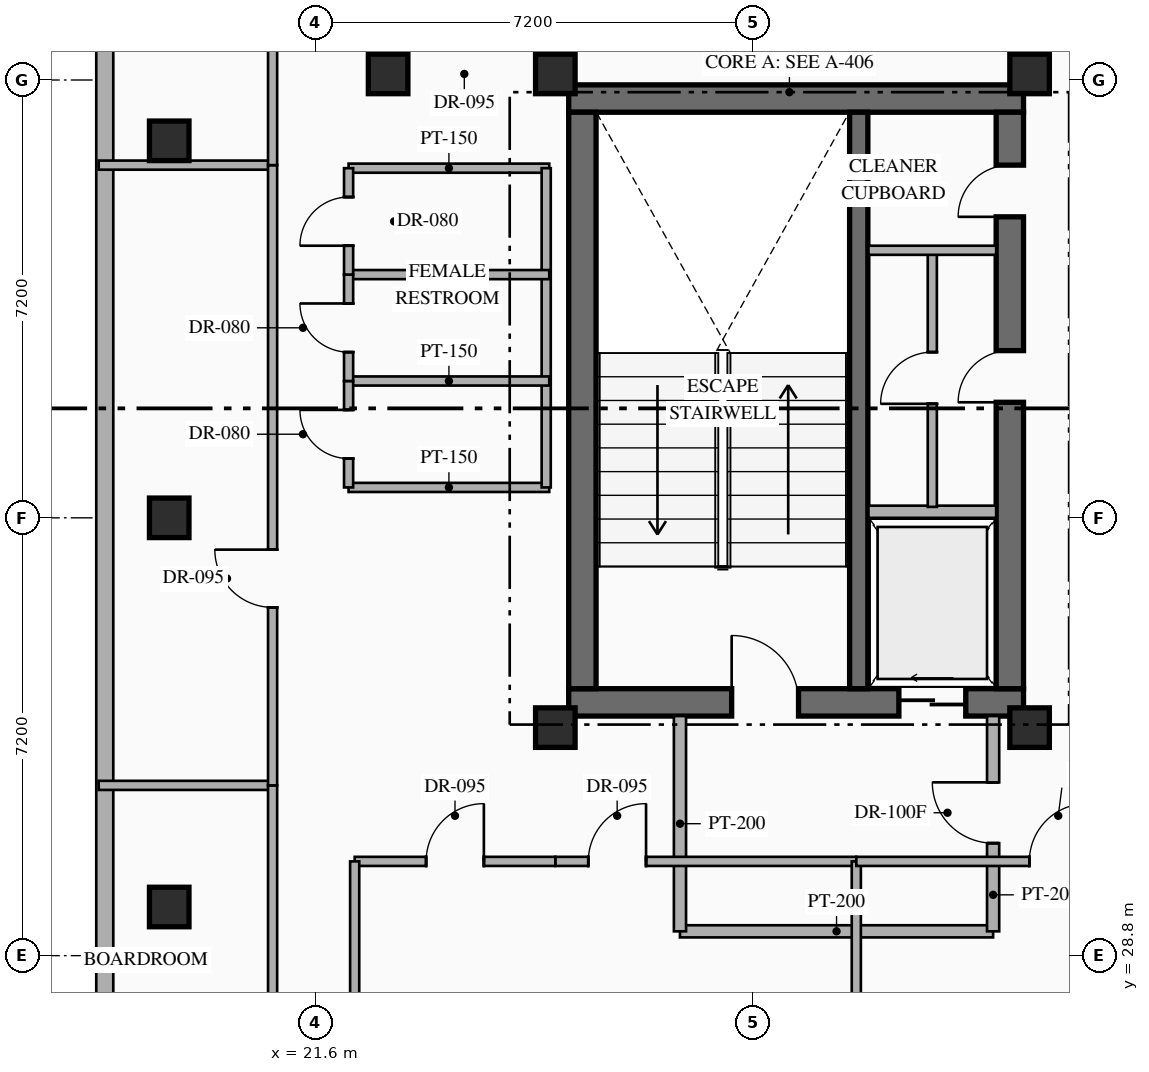
"""IFC4 building model, lengths in metres.
Left out: names, types, materials, properties, quantities, classifications, styles, units other than length and angle.
Written with IfcOpenShell. Run it as: python <this file> out.ifc"""

import sys

from ifc_helpers import new_model, si_unit, direction, frame, frame_2d, origin, origin_2d, place, context, subcontext, project, spatial, rectangle, hollow_rectangle, extrude, element, fill, save


model = new_model("IFC4")
c1 = context("Model", 3, precision=1e-05, world=origin(), true_north=direction((0.0, 1.0)))
c2 = subcontext(c1, "Body", "Model", "MODEL_VIEW")
j1 = project(units=[si_unit("LENGTHUNIT", "METRE"), si_unit("PLANEANGLEUNIT", "RADIAN")], contexts=[c1])
p1 = place(None, origin())
s1 = spatial("IfcSite", under=j1, at=p1, CompositionType="ELEMENT")
p2 = place(p1, origin())
s2 = spatial("IfcBuilding", under=s1, at=p2, CompositionType="ELEMENT")
p3 = place(p2, frame((0.0, 0.0, 253.95)))
s3 = spatial("IfcBuildingStorey", under=s2, at=p3, CompositionType="ELEMENT", Elevation=253.95)
p4 = place(p3, frame((25.77, 32.965, 0.0), z_axis=(0.0, 0.0, 1.0), x_axis=(1.0, 0.0, 0.0)))
e1 = element("IfcWall", 1, at=p4, inside=s3, PredefinedType="SHEAR", context=c2, shape_type="SweptSolid", body=[
    extrude(rectangle(XDim=7.48, YDim=0.45, at=frame_2d((3.74, 0.0))), origin(), (0.0, 0.0, 1.0), 3.6),
])
p5 = place(p4, frame((2.68, 0.0, 0.0)))
e2 = element("IfcOpeningElement", 2, at=p5, cuts=e1, PredefinedType="OPENING", context=c2, shape_type="SweptSolid", body=[
    extrude(rectangle(XDim=1.1, YDim=2.2, at=frame_2d((0.55, 1.1))), frame((0.0, 0.235, 0.0), z_axis=(0.0, -1.0, 0.0), x_axis=(1.0, 0.0, 0.0)), (0.0, 0.0, 1.0), 0.47),
])
p6 = place(p4, frame((5.43, 0.0, 0.0)))
e3 = element("IfcOpeningElement", 3, at=p6, cuts=e1, PredefinedType="OPENING", context=c2, shape_type="SweptSolid", body=[
    extrude(rectangle(XDim=1.1, YDim=2.15, at=frame_2d((0.55, 1.075))), frame((0.0, 0.235, 0.0), z_axis=(0.0, -1.0, 0.0), x_axis=(1.0, 0.0, 0.0)), (0.0, 0.0, 1.0), 0.47),
])
p7 = place(p3, frame((25.77, 42.895, 0.0), z_axis=(0.0, 0.0, 1.0), x_axis=(1.0, 0.0, 0.0)))
e4 = element("IfcWall", 4, at=p7, inside=s3, PredefinedType="SHEAR", context=c2, shape_type="SweptSolid", body=[
    extrude(rectangle(XDim=7.48, YDim=0.45, at=frame_2d((3.74, 0.0))), origin(), (0.0, 0.0, 1.0), 3.6),
])
p8 = place(p3, frame((25.995, 33.19, 0.0), z_axis=(0.0, 0.0, 1.0), x_axis=(0.0, 1.0, 0.0)))
e5 = element("IfcWall", 5, at=p8, inside=s3, PredefinedType="SHEAR", context=c2, shape_type="SweptSolid", body=[
    extrude(rectangle(XDim=9.48, YDim=0.45, at=frame_2d((4.74, 0.0))), origin(), (0.0, 0.0, 1.0), 3.6),
])
p9 = place(p3, frame((33.025, 33.19, 0.0), z_axis=(0.0, 0.0, 1.0), x_axis=(0.0, 1.0, 0.0)))
e6 = element("IfcWall", 6, at=p9, inside=s3, PredefinedType="SHEAR", context=c2, shape_type="SweptSolid", body=[
    extrude(rectangle(XDim=9.48, YDim=0.45, at=frame_2d((4.74, 0.0))), origin(), (0.0, 0.0, 1.0), 3.6),
])
p10 = place(p9, frame((4.71, 0.0, 0.0)))
e7 = element("IfcOpeningElement", 7, at=p10, cuts=e6, PredefinedType="OPENING", context=c2, shape_type="SweptSolid", body=[
    extrude(rectangle(XDim=0.85, YDim=2.08, at=frame_2d((0.425, 1.04))), frame((0.0, 0.235, 0.0), z_axis=(0.0, -1.0, 0.0), x_axis=(1.0, 0.0, 0.0)), (0.0, 0.0, 1.0), 0.47),
])
p11 = place(p9, frame((7.76, 0.0, 0.0)))
e8 = element("IfcOpeningElement", 8, at=p11, cuts=e6, PredefinedType="OPENING", context=c2, shape_type="SweptSolid", body=[
    extrude(rectangle(XDim=0.85, YDim=2.08, at=frame_2d((0.425, 1.04))), frame((0.0, 0.235, 0.0), z_axis=(0.0, -1.0, 0.0), x_axis=(1.0, 0.0, 0.0)), (0.0, 0.0, 1.0), 0.47),
])
p12 = place(p3, frame((30.54, 33.19, 0.0), z_axis=(0.0, 0.0, 1.0), x_axis=(0.0, 1.0, 0.0)))
e9 = element("IfcWall", 9, at=p12, inside=s3, PredefinedType="SHEAR", context=c2, shape_type="SweptSolid", body=[
    extrude(rectangle(XDim=9.48, YDim=0.3, at=frame_2d((4.74, 0.0))), origin(), (0.0, 0.0, 1.0), 3.6),
])
for number, where, z_axis, x_axis in (
    (10, (25.55, 32.55, 0.0), (0.0, 0.0, 1.0), (1.0, 0.0, 0.0)),
    (11, (33.35, 32.55, 0.0), (0.0, 0.0, 1.0), (1.0, 0.0, 0.0)),
    (12, (25.55, 43.3, 0.0), (0.0, 0.0, 1.0), (1.0, 0.0, 0.0)),
    (13, (33.35, 43.3, 0.0), (0.0, 0.0, 1.0), (1.0, 0.0, 0.0)),
    (14, (19.2, 29.6, 0.0), (0.0, 0.0, 1.0), (1.0, 0.0, 0.0)),
    (15, (19.2, 42.2, 0.0), (0.0, 0.0, 1.0), (1.0, 0.0, 0.0)),
    (16, (22.8, 43.3, 0.0), (0.0, 0.0, 1.0), (1.0, 0.0, 0.0)),
    (17, (19.2, 36.0, 0.0), (0.0, 0.0, 1.0), (1.0, 0.0, 0.0)),
):
    element("IfcColumn", number, at=place(p3, frame(where, z_axis=z_axis, x_axis=x_axis)), inside=s3, PredefinedType="COLUMN", context=c2, shape_type="SweptSolid", body=[
        extrude(hollow_rectangle(XDim=0.65, YDim=0.65, WallThickness=0.025, at=origin_2d()), origin(), (0.0, 0.0, 1.0), 3.6),
    ])
p13 = place(p3, frame((18.14, 25.858, 0.0), z_axis=(0.0, 0.0, 1.0), x_axis=(0.0, 1.0, 0.0)))
e18 = element("IfcWall", 18, at=p13, inside=s3, PredefinedType="STANDARD", context=c2, shape_type="SweptSolid", body=[
    extrude(rectangle(XDim=22.084, YDim=0.28, at=frame_2d((11.042, 0.0))), origin(), (0.0, 0.0, 1.0), 3.35),
])
p14 = place(p3, frame((30.7, 36.1, 0.0), z_axis=(0.0, 0.0, 1.0), x_axis=(1.0, 0.0, 0.0)))
e19 = element("IfcWall", 19, at=p14, inside=s3, PredefinedType="STANDARD", context=c2, shape_type="SweptSolid", body=[
    extrude(rectangle(XDim=2.1, YDim=0.2, at=frame_2d((1.05, 0.0))), origin(), (0.0, 0.0, 1.0), 3.35),
])
p15 = place(p3, frame((31.75, 36.18, 0.0), z_axis=(0.0, 0.0, 1.0), x_axis=(0.0, 1.0, 0.0)))
e20 = element("IfcWall", 20, at=p15, inside=s3, PredefinedType="PARTITIONING", context=c2, shape_type="SweptSolid", body=[
    extrude(rectangle(XDim=4.24, YDim=0.15, at=frame_2d((2.12, 0.0))), origin(), (0.0, 0.0, 1.0), 3.35),
])
p16 = place(p15, frame((1.695, 0.0, 0.0)))
e21 = element("IfcOpeningElement", 21, at=p16, cuts=e20, PredefinedType="OPENING", context=c2, shape_type="SweptSolid", body=[
    extrude(rectangle(XDim=0.85, YDim=2.08, at=frame_2d((0.425, 1.04))), frame((0.0, 0.085, 0.0), z_axis=(0.0, -1.0, 0.0), x_axis=(1.0, 0.0, 0.0)), (0.0, 0.0, 1.0), 0.17),
])
p17 = place(p3, frame((30.7, 40.4, 0.0), z_axis=(0.0, 0.0, 1.0), x_axis=(1.0, 0.0, 0.0)))
e22 = element("IfcWall", 22, at=p17, inside=s3, PredefinedType="PARTITIONING", context=c2, shape_type="SweptSolid", body=[
    extrude(rectangle(XDim=2.1, YDim=0.15, at=frame_2d((1.05, 0.0))), origin(), (0.0, 0.0, 1.0), 3.35),
])
p18 = place(p3, frame((27.6, 29.2, 0.0), z_axis=(0.0, 0.0, 1.0), x_axis=(1.0, 0.0, 0.0)))
e23 = element("IfcWall", 23, at=p18, inside=s3, PredefinedType="STANDARD", context=c2, shape_type="SweptSolid", body=[
    extrude(rectangle(XDim=5.15, YDim=0.2, at=frame_2d((2.575, 0.0))), origin(), (0.0, 0.0, 1.0), 3.35),
])
p19 = place(p3, frame((27.6, 29.2, 0.0), z_axis=(0.0, 0.0, 1.0), x_axis=(0.0, 1.0, 0.0)))
e24 = element("IfcWall", 24, at=p19, inside=s3, PredefinedType="STANDARD", context=c2, shape_type="SweptSolid", body=[
    extrude(rectangle(XDim=3.54, YDim=0.2, at=frame_2d((1.77, 0.0))), origin(), (0.0, 0.0, 1.0), 3.35),
])
p20 = place(p3, frame((32.75, 29.2, 0.0), z_axis=(0.0, 0.0, 1.0), x_axis=(0.0, 1.0, 0.0)))
e25 = element("IfcWall", 25, at=p20, inside=s3, PredefinedType="STANDARD", context=c2, shape_type="SweptSolid", body=[
    extrude(rectangle(XDim=3.54, YDim=0.2, at=frame_2d((1.77, 0.0))), origin(), (0.0, 0.0, 1.0), 3.35),
])
p21 = place(p20, frame((1.45, 0.0, 0.0)))
e26 = element("IfcOpeningElement", 26, at=p21, cuts=e25, PredefinedType="OPENING", context=c2, shape_type="SweptSolid", body=[
    extrude(rectangle(XDim=1.0, YDim=2.2, at=frame_2d((0.5, 1.1))), frame((0.0, 0.11, 0.0), z_axis=(0.0, -1.0, 0.0), x_axis=(1.0, 0.0, 0.0)), (0.0, 0.0, 1.0), 0.22),
])
for number, where, z_axis, x_axis in (
    (27, (22.15, 36.5, 0.0), (0.0, 0.0, 1.0), (1.0, 0.0, 0.0)),
    (28, (22.15, 41.75, 0.0), (0.0, 0.0, 1.0), (1.0, 0.0, 0.0)),
):
    element("IfcWall", number, at=place(p3, frame(where, z_axis=z_axis, x_axis=x_axis)), inside=s3, PredefinedType="PARTITIONING", context=c2, shape_type="SweptSolid", body=[
        extrude(rectangle(XDim=3.3, YDim=0.15, at=frame_2d((1.65, 0.0))), origin(), (0.0, 0.0, 1.0), 3.35),
    ])
p22 = place(p3, frame((25.4, 36.5, 0.0), z_axis=(0.0, 0.0, 1.0), x_axis=(0.0, 1.0, 0.0)))
e29 = element("IfcWall", 29, at=p22, inside=s3, PredefinedType="PARTITIONING", context=c2, shape_type="SweptSolid", body=[
    extrude(rectangle(XDim=5.25, YDim=0.15, at=frame_2d((2.625, 0.0))), origin(), (0.0, 0.0, 1.0), 3.35),
])
for number, where, z_axis, x_axis in (
    (30, (22.15, 38.25, 0.0), (0.0, 0.0, 1.0), (1.0, 0.0, 0.0)),
    (31, (22.15, 40.0, 0.0), (0.0, 0.0, 1.0), (1.0, 0.0, 0.0)),
):
    element("IfcWall", number, at=place(p3, frame(where, z_axis=z_axis, x_axis=x_axis)), inside=s3, PredefinedType="PARTITIONING", context=c2, shape_type="SweptSolid", body=[
        extrude(rectangle(XDim=3.3, YDim=0.15, at=frame_2d((1.65, 0.0))), origin(), (0.0, 0.0, 1.0), 3.35),
    ])
p23 = place(p3, frame((22.15, 36.5, 0.0), z_axis=(0.0, 0.0, 1.0), x_axis=(0.0, 1.0, 0.0)))
e32 = element("IfcWall", 32, at=p23, inside=s3, PredefinedType="PARTITIONING", context=c2, shape_type="SweptSolid", body=[
    extrude(rectangle(XDim=1.75, YDim=0.15, at=frame_2d((0.875, 0.0))), origin(), (0.0, 0.0, 1.0), 3.35),
])
p24 = place(p23, frame((0.475, 0.0, 0.0)))
e33 = element("IfcOpeningElement", 33, at=p24, cuts=e32, PredefinedType="OPENING", context=c2, shape_type="SweptSolid", body=[
    extrude(rectangle(XDim=0.8, YDim=2.06, at=frame_2d((0.4, 1.03))), frame((0.0, 0.085, 0.0), z_axis=(0.0, -1.0, 0.0), x_axis=(1.0, 0.0, 0.0)), (0.0, 0.0, 1.0), 0.17),
])
p25 = place(p3, frame((22.15, 38.25, 0.0), z_axis=(0.0, 0.0, 1.0), x_axis=(0.0, 1.0, 0.0)))
e34 = element("IfcWall", 34, at=p25, inside=s3, PredefinedType="PARTITIONING", context=c2, shape_type="SweptSolid", body=[
    extrude(rectangle(XDim=1.75, YDim=0.15, at=frame_2d((0.875, 0.0))), origin(), (0.0, 0.0, 1.0), 3.35),
])
p26 = place(p25, frame((0.475, 0.0, 0.0)))
e35 = element("IfcOpeningElement", 35, at=p26, cuts=e34, PredefinedType="OPENING", context=c2, shape_type="SweptSolid", body=[
    extrude(rectangle(XDim=0.8, YDim=2.06, at=frame_2d((0.4, 1.03))), frame((0.0, 0.085, 0.0), z_axis=(0.0, -1.0, 0.0), x_axis=(1.0, 0.0, 0.0)), (0.0, 0.0, 1.0), 0.17),
])
p27 = place(p3, frame((22.15, 40.0, 0.0), z_axis=(0.0, 0.0, 1.0), x_axis=(0.0, 1.0, 0.0)))
e36 = element("IfcWall", 36, at=p27, inside=s3, PredefinedType="PARTITIONING", context=c2, shape_type="SweptSolid", body=[
    extrude(rectangle(XDim=1.75, YDim=0.15, at=frame_2d((0.875, 0.0))), origin(), (0.0, 0.0, 1.0), 3.35),
])
p28 = place(p27, frame((0.475, 0.0, 0.0)))
e37 = element("IfcOpeningElement", 37, at=p28, cuts=e36, PredefinedType="OPENING", context=c2, shape_type="SweptSolid", body=[
    extrude(rectangle(XDim=0.8, YDim=2.06, at=frame_2d((0.4, 1.03))), frame((0.0, 0.085, 0.0), z_axis=(0.0, -1.0, 0.0), x_axis=(1.0, 0.0, 0.0)), (0.0, 0.0, 1.0), 0.17),
])
p29 = place(p3, frame((25.55, 30.35, 0.0), z_axis=(0.0, 0.0, 1.0), x_axis=(1.0, 0.0, 0.0)))
e38 = element("IfcWall", 38, at=p29, inside=s3, PredefinedType="PARTITIONING", context=c2, shape_type="SweptSolid", body=[
    extrude(rectangle(XDim=4.95, YDim=0.15, at=frame_2d((2.475, 0.0))), origin(), (0.0, 0.0, 1.0), 3.35),
])
p30 = place(p29, frame((0.542, 0.0, 0.0)))
e39 = element("IfcOpeningElement", 39, at=p30, cuts=e38, PredefinedType="OPENING", context=c2, shape_type="SweptSolid", body=[
    extrude(rectangle(XDim=0.95, YDim=2.15, at=frame_2d((0.475, 1.075))), frame((0.0, 0.085, 0.0), z_axis=(0.0, -1.0, 0.0), x_axis=(1.0, 0.0, 0.0)), (0.0, 0.0, 1.0), 0.17),
])
p31 = place(p3, frame((30.5, 23.2, 0.0), z_axis=(0.0, 0.0, 1.0), x_axis=(0.0, 1.0, 0.0)))
e40 = element("IfcWall", 40, at=p31, inside=s3, PredefinedType="PARTITIONING", context=c2, shape_type="SweptSolid", body=[
    extrude(rectangle(XDim=7.15, YDim=0.15, at=frame_2d((3.575, 0.0))), origin(), (0.0, 0.0, 1.0), 3.35),
])
p32 = place(p3, frame((30.5, 30.35, 0.0), z_axis=(0.0, 0.0, 1.0), x_axis=(1.0, 0.0, 0.0)))
e41 = element("IfcWall", 41, at=p32, inside=s3, PredefinedType="PARTITIONING", context=c2, shape_type="SweptSolid", body=[
    extrude(rectangle(XDim=4.45, YDim=0.15, at=frame_2d((2.225, 0.0))), origin(), (0.0, 0.0, 1.0), 3.35),
])
p33 = place(p32, frame((2.846, 0.0, 0.0)))
e42 = element("IfcOpeningElement", 42, at=p33, cuts=e41, PredefinedType="OPENING", context=c2, shape_type="SweptSolid", body=[
    extrude(rectangle(XDim=0.95, YDim=2.15, at=frame_2d((0.475, 1.075))), frame((0.0, 0.085, 0.0), z_axis=(0.0, -1.0, 0.0), x_axis=(1.0, 0.0, 0.0)), (0.0, 0.0, 1.0), 0.17),
])
p34 = place(p3, frame((18.04, 31.6, 0.0), z_axis=(0.0, 0.0, 1.0), x_axis=(1.0, 0.0, 0.0)))
e43 = element("IfcWall", 43, at=p34, inside=s3, PredefinedType="PARTITIONING", context=c2, shape_type="SweptSolid", body=[
    extrude(rectangle(XDim=2.86, YDim=0.15, at=frame_2d((1.43, 0.0))), origin(), (0.0, 0.0, 1.0), 3.35),
])
p35 = place(p3, frame((20.9, 23.44, 0.0), z_axis=(0.0, 0.0, 1.0), x_axis=(0.0, 1.0, 0.0)))
e44 = element("IfcWall", 44, at=p35, inside=s3, PredefinedType="PARTITIONING", context=c2, shape_type="SweptSolid", body=[
    extrude(rectangle(XDim=8.16, YDim=0.15, at=frame_2d((4.08, 0.0))), origin(), (0.0, 0.0, 1.0), 3.35),
])
p36 = place(p35, frame((3.605, 0.0, 0.0)))
e45 = element("IfcOpeningElement", 45, at=p36, cuts=e44, PredefinedType="OPENING", context=c2, shape_type="SweptSolid", body=[
    extrude(rectangle(XDim=0.95, YDim=2.15, at=frame_2d((0.475, 1.075))), frame((0.0, 0.085, 0.0), z_axis=(0.0, -1.0, 0.0), x_axis=(1.0, 0.0, 0.0)), (0.0, 0.0, 1.0), 0.17),
])
p37 = place(p3, frame((18.04, 41.8, 0.0), z_axis=(0.0, 0.0, 1.0), x_axis=(1.0, 0.0, 0.0)))
e46 = element("IfcWall", 46, at=p37, inside=s3, PredefinedType="PARTITIONING", context=c2, shape_type="SweptSolid", body=[
    extrude(rectangle(XDim=2.86, YDim=0.15, at=frame_2d((1.43, 0.0))), origin(), (0.0, 0.0, 1.0), 3.35),
])
p38 = place(p3, frame((20.9, 31.6, 0.0), z_axis=(0.0, 0.0, 1.0), x_axis=(0.0, 1.0, 0.0)))
e47 = element("IfcWall", 47, at=p38, inside=s3, PredefinedType="PARTITIONING", context=c2, shape_type="SweptSolid", body=[
    extrude(rectangle(XDim=10.2, YDim=0.15, at=frame_2d((5.1, 0.0))), origin(), (0.0, 0.0, 1.0), 3.35),
])
p39 = place(p38, frame((2.927, 0.0, 0.0)))
e48 = element("IfcOpeningElement", 48, at=p39, cuts=e47, PredefinedType="OPENING", context=c2, shape_type="SweptSolid", body=[
    extrude(rectangle(XDim=0.95, YDim=2.15, at=frame_2d((0.475, 1.075))), frame((0.0, 0.085, 0.0), z_axis=(0.0, -1.0, 0.0), x_axis=(1.0, 0.0, 0.0)), (0.0, 0.0, 1.0), 0.17),
])
p40 = place(p3, frame((20.9, 41.8, 0.0), z_axis=(0.0, 0.0, 1.0), x_axis=(0.0, 1.0, 0.0)))
e49 = element("IfcWall", 49, at=p40, inside=s3, PredefinedType="PARTITIONING", context=c2, shape_type="SweptSolid", body=[
    extrude(rectangle(XDim=8.56, YDim=0.15, at=frame_2d((4.28, 0.0))), origin(), (0.0, 0.0, 1.0), 3.35),
])
p41 = place(p40, frame((3.805, 0.0, 0.0)))
e50 = element("IfcOpeningElement", 50, at=p41, cuts=e49, PredefinedType="OPENING", context=c2, shape_type="SweptSolid", body=[
    extrude(rectangle(XDim=0.95, YDim=2.15, at=frame_2d((0.475, 1.075))), frame((0.0, 0.085, 0.0), z_axis=(0.0, -1.0, 0.0), x_axis=(1.0, 0.0, 0.0)), (0.0, 0.0, 1.0), 0.17),
])
p42 = place(p3, frame((22.25, 30.35, 0.0), z_axis=(0.0, 0.0, 1.0), x_axis=(1.0, 0.0, 0.0)))
e51 = element("IfcWall", 51, at=p42, inside=s3, PredefinedType="PARTITIONING", context=c2, shape_type="SweptSolid", body=[
    extrude(rectangle(XDim=3.3, YDim=0.15, at=frame_2d((1.65, 0.0))), origin(), (0.0, 0.0, 1.0), 3.35),
])
p43 = place(p42, frame((1.175, 0.0, 0.0)))
e52 = element("IfcOpeningElement", 52, at=p43, cuts=e51, PredefinedType="OPENING", context=c2, shape_type="SweptSolid", body=[
    extrude(rectangle(XDim=0.95, YDim=2.15, at=frame_2d((0.475, 1.075))), frame((0.0, 0.085, 0.0), z_axis=(0.0, -1.0, 0.0), x_axis=(1.0, 0.0, 0.0)), (0.0, 0.0, 1.0), 0.17),
])
p44 = place(p3, frame((22.25, 23.44, 0.0), z_axis=(0.0, 0.0, 1.0), x_axis=(0.0, 1.0, 0.0)))
e53 = element("IfcWall", 53, at=p44, inside=s3, PredefinedType="PARTITIONING", context=c2, shape_type="SweptSolid", body=[
    extrude(rectangle(XDim=6.91, YDim=0.15, at=frame_2d((3.455, 0.0))), origin(), (0.0, 0.0, 1.0), 3.35),
])
p45 = place(p5, origin())
e54 = element("IfcDoor", 54, at=p45, inside=s3, OperationType="SINGLE_SWING_LEFT", PredefinedType="DOOR", context=c2, shape_type="SweptSolid", body=[
    extrude(rectangle(XDim=1.1, YDim=2.2, at=frame_2d((0.55, 1.1))), frame((0.0, 0.025, 0.0), z_axis=(0.0, -1.0, 0.0), x_axis=(1.0, 0.0, 0.0)), (0.0, 0.0, 1.0), 0.05),
])
fill(e2, e54)
p46 = place(p6, origin())
e55 = element("IfcDoor", 55, at=p46, inside=s3, OperationType="SLIDING_TO_LEFT", PredefinedType="USERDEFINED", context=c2, shape_type="SweptSolid", body=[
    extrude(rectangle(XDim=1.1, YDim=2.15, at=frame_2d((0.55, 1.075))), frame((0.0, 0.025, 0.0), z_axis=(0.0, -1.0, 0.0), x_axis=(1.0, 0.0, 0.0)), (0.0, 0.0, 1.0), 0.05),
])
fill(e3, e55)
p47 = place(p10, origin())
e56 = element("IfcDoor", 56, at=p47, inside=s3, OperationType="SINGLE_SWING_LEFT", PredefinedType="DOOR", context=c2, shape_type="SweptSolid", body=[
    extrude(rectangle(XDim=0.85, YDim=2.08, at=frame_2d((0.425, 1.04))), frame((0.0, 0.025, 0.0), z_axis=(0.0, -1.0, 0.0), x_axis=(1.0, 0.0, 0.0)), (0.0, 0.0, 1.0), 0.05),
])
fill(e7, e56)
p48 = place(p11, origin())
e57 = element("IfcDoor", 57, at=p48, inside=s3, OperationType="SINGLE_SWING_LEFT", PredefinedType="DOOR", context=c2, shape_type="SweptSolid", body=[
    extrude(rectangle(XDim=0.85, YDim=2.08, at=frame_2d((0.425, 1.04))), frame((0.0, 0.025, 0.0), z_axis=(0.0, -1.0, 0.0), x_axis=(1.0, 0.0, 0.0)), (0.0, 0.0, 1.0), 0.05),
])
fill(e8, e57)
p49 = place(p16, origin())
e58 = element("IfcDoor", 58, at=p49, inside=s3, OperationType="SINGLE_SWING_LEFT", PredefinedType="DOOR", context=c2, shape_type="SweptSolid", body=[
    extrude(rectangle(XDim=0.85, YDim=2.08, at=frame_2d((0.425, 1.04))), frame((0.0, 0.025, 0.0), z_axis=(0.0, -1.0, 0.0), x_axis=(1.0, 0.0, 0.0)), (0.0, 0.0, 1.0), 0.05),
])
fill(e21, e58)
p50 = place(p21, origin())
e59 = element("IfcDoor", 59, at=p50, inside=s3, OperationType="SINGLE_SWING_RIGHT", PredefinedType="DOOR", context=c2, shape_type="SweptSolid", body=[
    extrude(rectangle(XDim=1.0, YDim=2.2, at=frame_2d((0.5, 1.1))), frame((0.0, 0.025, 0.0), z_axis=(0.0, -1.0, 0.0), x_axis=(1.0, 0.0, 0.0)), (0.0, 0.0, 1.0), 0.05),
])
fill(e26, e59)
p51 = place(p24, origin())
e60 = element("IfcDoor", 60, at=p51, inside=s3, OperationType="SINGLE_SWING_RIGHT", PredefinedType="DOOR", context=c2, shape_type="SweptSolid", body=[
    extrude(rectangle(XDim=0.8, YDim=2.06, at=frame_2d((0.4, 1.03))), frame((0.0, 0.025, 0.0), z_axis=(0.0, -1.0, 0.0), x_axis=(1.0, 0.0, 0.0)), (0.0, 0.0, 1.0), 0.05),
])
fill(e33, e60)
p52 = place(p26, origin())
e61 = element("IfcDoor", 61, at=p52, inside=s3, OperationType="SINGLE_SWING_RIGHT", PredefinedType="DOOR", context=c2, shape_type="SweptSolid", body=[
    extrude(rectangle(XDim=0.8, YDim=2.06, at=frame_2d((0.4, 1.03))), frame((0.0, 0.025, 0.0), z_axis=(0.0, -1.0, 0.0), x_axis=(1.0, 0.0, 0.0)), (0.0, 0.0, 1.0), 0.05),
])
fill(e35, e61)
p53 = place(p28, origin())
e62 = element("IfcDoor", 62, at=p53, inside=s3, OperationType="SINGLE_SWING_LEFT", PredefinedType="DOOR", context=c2, shape_type="SweptSolid", body=[
    extrude(rectangle(XDim=0.8, YDim=2.06, at=frame_2d((0.4, 1.03))), frame((0.0, 0.025, 0.0), z_axis=(0.0, -1.0, 0.0), x_axis=(1.0, 0.0, 0.0)), (0.0, 0.0, 1.0), 0.05),
])
fill(e37, e62)
p54 = place(p30, origin())
e63 = element("IfcDoor", 63, at=p54, inside=s3, OperationType="SINGLE_SWING_RIGHT", PredefinedType="DOOR", context=c2, shape_type="SweptSolid", body=[
    extrude(rectangle(XDim=0.95, YDim=2.15, at=frame_2d((0.475, 1.075))), frame((0.0, 0.025, 0.0), z_axis=(0.0, -1.0, 0.0), x_axis=(1.0, 0.0, 0.0)), (0.0, 0.0, 1.0), 0.05),
])
fill(e39, e63)
p55 = place(p33, origin())
e64 = element("IfcDoor", 64, at=p55, inside=s3, OperationType="SINGLE_SWING_RIGHT", PredefinedType="DOOR", context=c2, shape_type="SweptSolid", body=[
    extrude(rectangle(XDim=0.95, YDim=2.15, at=frame_2d((0.475, 1.075))), frame((0.0, 0.025, 0.0), z_axis=(0.0, -1.0, 0.0), x_axis=(1.0, 0.0, 0.0)), (0.0, 0.0, 1.0), 0.05),
])
fill(e42, e64)
p56 = place(p39, origin())
e65 = element("IfcDoor", 65, at=p56, inside=s3, OperationType="SINGLE_SWING_RIGHT", PredefinedType="DOOR", context=c2, shape_type="SweptSolid", body=[
    extrude(rectangle(XDim=0.95, YDim=2.15, at=frame_2d((0.475, 1.075))), frame((0.0, 0.025, 0.0), z_axis=(0.0, -1.0, 0.0), x_axis=(1.0, 0.0, 0.0)), (0.0, 0.0, 1.0), 0.05),
])
fill(e48, e65)
p57 = place(p43, origin())
e66 = element("IfcDoor", 66, at=p57, inside=s3, OperationType="SINGLE_SWING_RIGHT", PredefinedType="DOOR", context=c2, shape_type="SweptSolid", body=[
    extrude(rectangle(XDim=0.95, YDim=2.15, at=frame_2d((0.475, 1.075))), frame((0.0, 0.025, 0.0), z_axis=(0.0, -1.0, 0.0), x_axis=(1.0, 0.0, 0.0)), (0.0, 0.0, 1.0), 0.05),
])
fill(e52, e66)
save(model, sys.argv[1])
